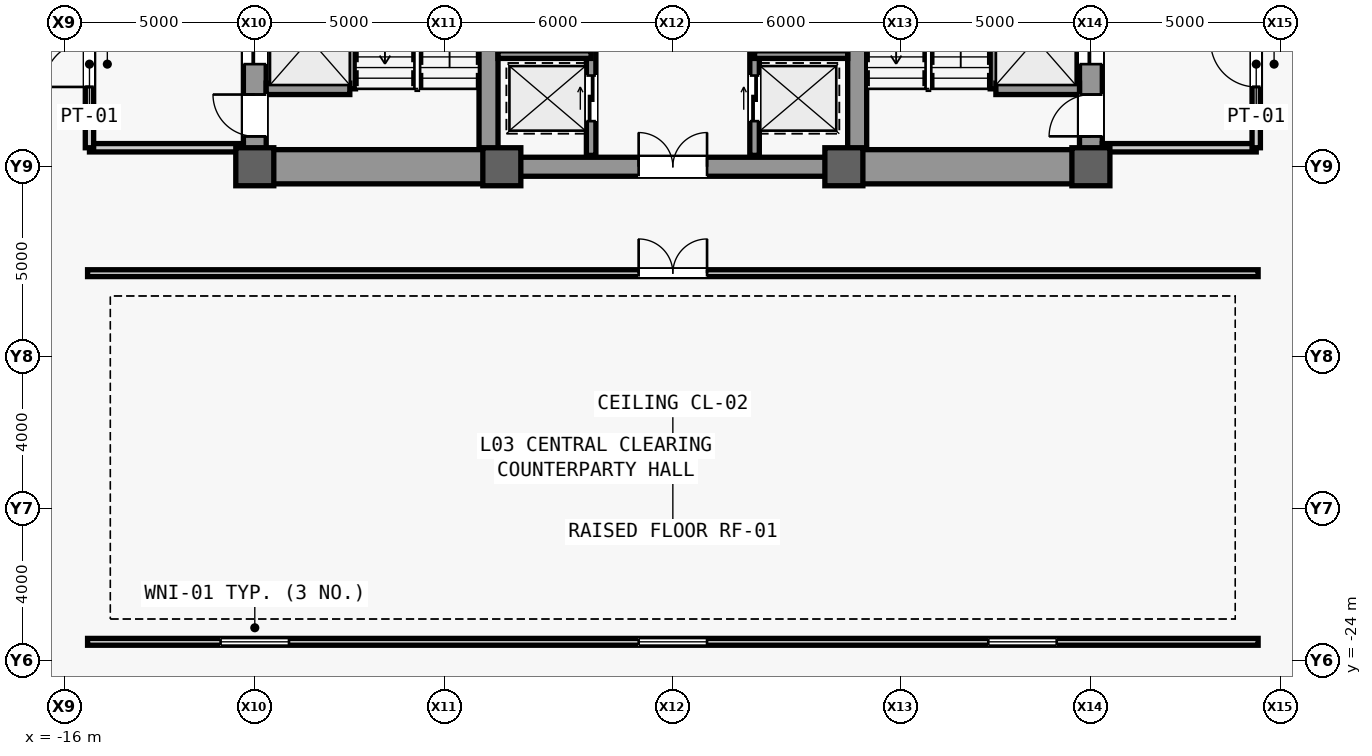
"""IFC4 building model, lengths in metres.
Left out: names, types, materials, properties, quantities, classifications, styles, units other than length and angle.
Written with IfcOpenShell. Run it as: python <this file> out.ifc"""

import sys

from ifc_helpers import new_model, si_unit, direction, frame, frame_2d, origin, origin_2d, place, context, subcontext, project, spatial, rectangle, extrude, source, transform, mapped, element, fill, save


model = new_model("IFC4")
c1 = context("Model", 3, precision=1e-05, world=origin(), true_north=direction((0.0, 1.0)))
c2 = subcontext(c1, "Body", "Model", "MODEL_VIEW")
j1 = project(units=[si_unit("LENGTHUNIT", "METRE"), si_unit("PLANEANGLEUNIT", "RADIAN")], contexts=[c1])
p1 = place(None, origin())
s1 = spatial("IfcSite", under=j1, at=p1, CompositionType="ELEMENT")
p2 = place(p1, origin())
s2 = spatial("IfcBuilding", under=s1, at=p2, CompositionType="ELEMENT")
p3 = place(p2, frame((0.0, 0.0, 17.4)))
s3 = spatial("IfcBuildingStorey", under=s2, at=p3, CompositionType="ELEMENT", Elevation=17.4)
m1 = source(origin(), c2, "Body", "SweptSolid", [
    extrude(rectangle(XDim=22.0, YDim=0.6, at=frame_2d((11.0, 0.0))), origin(), (0.0, 0.0, 1.0), 4.48),
])
p4 = place(p3, frame((-11.0, -11.0, 0.0), z_axis=(0.0, 0.0, 1.0), x_axis=(0.0, 1.0, 0.0)))
e1 = element("IfcWall", 1, at=p4, inside=s3, PredefinedType="SHEAR", context=c2, shape_type="MappedRepresentation", body=[
    mapped(m1, transform((0.0, 0.0, 0.0), scale=1.0)),
])
m2 = source(origin(), c2, "Body", "SweptSolid", [
    extrude(rectangle(XDim=1.1, YDim=2.2, at=frame_2d((0.55, 1.1))), frame((0.0, 0.31, 0.0), z_axis=(0.0, -1.0, 0.0), x_axis=(1.0, 0.0, 0.0)), (0.0, 0.0, 1.0), 0.62),
])
p5 = place(p4, frame((0.8, 0.0, 0.0)))
e2 = element("IfcOpeningElement", 2, at=p5, cuts=e1, PredefinedType="OPENING", context=c2, shape_type="MappedRepresentation", body=[
    mapped(m2, transform((0.0, 0.0, 0.0), scale=1.0)),
])
p6 = place(p4, frame((12.5, 0.0, 0.0)))
e3 = element("IfcOpeningElement", 3, at=p6, cuts=e1, PredefinedType="OPENING", context=c2, shape_type="MappedRepresentation", body=[
    mapped(m2, transform((0.0, 0.0, 0.0), scale=1.0)),
])
m3 = source(origin(), c2, "Body", "SweptSolid", [
    extrude(rectangle(XDim=0.9, YDim=2.15, at=frame_2d((0.45, 1.075))), frame((0.0, 0.31, 0.0), z_axis=(0.0, -1.0, 0.0), x_axis=(1.0, 0.0, 0.0)), (0.0, 0.0, 1.0), 0.62),
])
p7 = place(p4, frame((6.2, 0.0, 0.0)))
e4 = element("IfcOpeningElement", 4, at=p7, cuts=e1, PredefinedType="OPENING", context=c2, shape_type="MappedRepresentation", body=[
    mapped(m3, transform((0.0, 0.0, 0.0), scale=1.0)),
])
p8 = place(p4, frame((8.05, 0.0, 0.0)))
e5 = element("IfcOpeningElement", 5, at=p8, cuts=e1, PredefinedType="OPENING", context=c2, shape_type="MappedRepresentation", body=[
    mapped(m3, transform((0.0, 0.0, 0.0), scale=1.0)),
])
m4 = source(origin(), c2, "Body", "SweptSolid", [
    extrude(rectangle(XDim=1.3, YDim=2.3, at=frame_2d((0.65, 1.15))), frame((0.0, 0.31, 0.0), z_axis=(0.0, -1.0, 0.0), x_axis=(1.0, 0.0, 0.0)), (0.0, 0.0, 1.0), 0.62),
])
p9 = place(p4, frame((2.7, 0.0, 0.0)))
e6 = element("IfcOpeningElement", 6, at=p9, cuts=e1, PredefinedType="OPENING", context=c2, shape_type="MappedRepresentation", body=[
    mapped(m4, transform((0.0, 0.0, 0.0), scale=1.0)),
])
p10 = place(p3, frame((11.0, -11.0, 0.0), z_axis=(0.0, 0.0, 1.0), x_axis=(0.0, 1.0, 0.0)))
e7 = element("IfcWall", 7, at=p10, inside=s3, PredefinedType="SHEAR", context=c2, shape_type="MappedRepresentation", body=[
    mapped(m1, transform((0.0, 0.0, 0.0), scale=1.0)),
])
p11 = place(p10, frame((0.8, 0.0, 0.0)))
e8 = element("IfcOpeningElement", 8, at=p11, cuts=e7, PredefinedType="OPENING", context=c2, shape_type="MappedRepresentation", body=[
    mapped(m2, transform((0.0, 0.0, 0.0), scale=1.0)),
])
p12 = place(p10, frame((6.85, 0.0, 0.0)))
e9 = element("IfcOpeningElement", 9, at=p12, cuts=e7, PredefinedType="OPENING", context=c2, shape_type="MappedRepresentation", body=[
    mapped(m3, transform((0.0, 0.0, 0.0), scale=1.0)),
])
p13 = place(p10, frame((2.7, 0.0, 0.0)))
e10 = element("IfcOpeningElement", 10, at=p13, cuts=e7, PredefinedType="OPENING", context=c2, shape_type="MappedRepresentation", body=[
    mapped(m4, transform((0.0, 0.0, 0.0), scale=1.0)),
])
p14 = place(p10, frame((13.35, 0.0, 0.0)))
e11 = element("IfcOpeningElement", 11, at=p14, cuts=e7, PredefinedType="OPENING", context=c2, shape_type="MappedRepresentation", body=[
    mapped(m4, transform((0.0, 0.0, 0.0), scale=1.0)),
])
m5 = source(origin(), c2, "Body", "SweptSolid", [
    extrude(rectangle(XDim=21.4, YDim=0.5, at=frame_2d((10.7, 0.0))), origin(), (0.0, 0.0, 1.0), 4.48),
])
for number, where, z_axis, x_axis in (
    (12, (-4.85, -10.7, 0.0), (0.0, 0.0, 1.0), (0.0, 1.0, 0.0)),
    (13, (4.85, -10.7, 0.0), (0.0, 0.0, 1.0), (0.0, 1.0, 0.0)),
):
    element("IfcWall", number, at=place(p3, frame(where, z_axis=z_axis, x_axis=x_axis)), inside=s3, PredefinedType="SHEAR", context=c2, shape_type="MappedRepresentation", body=[
        mapped(m5, transform((0.0, 0.0, 0.0), scale=1.0)),
    ])
m6 = source(origin(), c2, "Body", "SweptSolid", [
    extrude(rectangle(XDim=5.85, YDim=0.9, at=frame_2d((2.925, 0.0))), origin(), (0.0, 0.0, 1.0), 4.48),
])
for number, where, z_axis, x_axis in (
    (14, (-10.7, -11.0, 0.0), (0.0, 0.0, 1.0), (1.0, 0.0, 0.0)),
    (15, (4.85, -11.0, 0.0), (0.0, 0.0, 1.0), (1.0, 0.0, 0.0)),
):
    element("IfcWall", number, at=place(p3, frame(where, z_axis=z_axis, x_axis=x_axis)), inside=s3, PredefinedType="SHEAR", context=c2, shape_type="MappedRepresentation", body=[
        mapped(m6, transform((0.0, 0.0, 0.0), scale=1.0)),
    ])
m7 = source(origin(), c2, "Body", "SweptSolid", [
    extrude(rectangle(XDim=9.2, YDim=0.5, at=frame_2d((4.6, 0.0))), origin(), (0.0, 0.0, 1.0), 4.48),
])
p15 = place(p3, frame((-4.6, -11.0, 0.0), z_axis=(0.0, 0.0, 1.0), x_axis=(1.0, 0.0, 0.0)))
e16 = element("IfcWall", 16, at=p15, inside=s3, PredefinedType="SHEAR", context=c2, shape_type="MappedRepresentation", body=[
    mapped(m7, transform((0.0, 0.0, 0.0), scale=1.0)),
])
m8 = source(origin(), c2, "Body", "SweptSolid", [
    extrude(rectangle(XDim=1.8, YDim=2.25, at=frame_2d((0.9, 1.125))), frame((0.0, 0.26, 0.0), z_axis=(0.0, -1.0, 0.0), x_axis=(1.0, 0.0, 0.0)), (0.0, 0.0, 1.0), 0.52),
])
p16 = place(p15, frame((3.7, 0.0, 0.0)))
e17 = element("IfcOpeningElement", 17, at=p16, cuts=e16, PredefinedType="OPENING", context=c2, shape_type="MappedRepresentation", body=[
    mapped(m8, transform((0.0, 0.0, 0.0), scale=1.0)),
])
m9 = source(origin(), c2, "Body", "SweptSolid", [
    extrude(rectangle(XDim=1.0, YDim=1.0, at=origin_2d()), origin(), (0.0, 0.0, 1.0), 4.8),
])
for number, where, z_axis, x_axis in (
    (18, (-11.0, -11.0, 0.0), (0.0, 0.0, 1.0), (1.0, 0.0, 0.0)),
    (19, (-4.5, -11.0, 0.0), (0.0, 0.0, 1.0), (1.0, 0.0, 0.0)),
    (20, (4.5, -11.0, 0.0), (0.0, 0.0, 1.0), (1.0, 0.0, 0.0)),
    (21, (11.0, -11.0, 0.0), (0.0, 0.0, 1.0), (1.0, 0.0, 0.0)),
):
    element("IfcColumn", number, at=place(p3, frame(where, z_axis=z_axis, x_axis=x_axis)), inside=s3, PredefinedType="COLUMN", context=c2, shape_type="MappedRepresentation", body=[
        mapped(m9, transform((0.0, 0.0, 0.0), scale=1.0)),
    ])
m10 = source(origin(), c2, "Body", "SweptSolid", [
    extrude(rectangle(XDim=7.8, YDim=0.3, at=frame_2d((3.9, 0.0))), origin(), (0.0, 0.0, 1.0), 4.48),
])
p17 = place(p3, frame((-8.5, -8.95, 0.0), z_axis=(0.0, 0.0, 1.0), x_axis=(0.0, 1.0, 0.0)))
e22 = element("IfcWall", 22, at=p17, inside=s3, PredefinedType="SHEAR", context=c2, shape_type="MappedRepresentation", body=[
    mapped(m10, transform((0.0, 0.0, 0.0), scale=1.0)),
])
m11 = source(origin(), c2, "Body", "SweptSolid", [
    extrude(rectangle(XDim=2.2, YDim=0.3, at=frame_2d((1.1, 0.0))), origin(), (0.0, 0.0, 1.0), 4.48),
])
p18 = place(p3, frame((-10.7, -8.95, 0.0), z_axis=(0.0, 0.0, 1.0), x_axis=(1.0, 0.0, 0.0)))
e23 = element("IfcWall", 23, at=p18, inside=s3, PredefinedType="SHEAR", context=c2, shape_type="MappedRepresentation", body=[
    mapped(m11, transform((0.0, 0.0, 0.0), scale=1.0)),
])
p19 = place(p3, frame((8.5, -8.95, 0.0), z_axis=(0.0, 0.0, 1.0), x_axis=(0.0, 1.0, 0.0)))
e24 = element("IfcWall", 24, at=p19, inside=s3, PredefinedType="SHEAR", context=c2, shape_type="MappedRepresentation", body=[
    mapped(m10, transform((0.0, 0.0, 0.0), scale=1.0)),
])
p20 = place(p3, frame((8.5, -8.95, 0.0), z_axis=(0.0, 0.0, 1.0), x_axis=(1.0, 0.0, 0.0)))
e25 = element("IfcWall", 25, at=p20, inside=s3, PredefinedType="SHEAR", context=c2, shape_type="MappedRepresentation", body=[
    mapped(m11, transform((0.0, 0.0, 0.0), scale=1.0)),
])
m12 = source(origin(), c2, "Body", "SweptSolid", [
    extrude(rectangle(XDim=4.05, YDim=0.22, at=frame_2d((2.025, 0.0))), origin(), (0.0, 0.0, 1.0), 4.48),
])
p21 = place(p3, frame((-15.35, -10.5, 0.0), z_axis=(0.0, 0.0, 1.0), x_axis=(1.0, 0.0, 0.0)))
e26 = element("IfcWall", 26, at=p21, inside=s3, PredefinedType="PARTITIONING", context=c2, shape_type="MappedRepresentation", body=[
    mapped(m12, transform((0.0, 0.0, 0.0), scale=1.0)),
])
m13 = source(origin(), c2, "Body", "SweptSolid", [
    extrude(rectangle(XDim=4.4, YDim=0.22, at=frame_2d((2.2, 0.0))), origin(), (0.0, 0.0, 1.0), 4.48),
])
p22 = place(p3, frame((-15.35, -10.5, 0.0), z_axis=(0.0, 0.0, 1.0), x_axis=(0.0, 1.0, 0.0)))
e27 = element("IfcWall", 27, at=p22, inside=s3, PredefinedType="PARTITIONING", context=c2, shape_type="MappedRepresentation", body=[
    mapped(m13, transform((0.0, 0.0, 0.0), scale=1.0)),
])
m14 = source(origin(), c2, "Body", "SweptSolid", [
    extrude(rectangle(XDim=1.2, YDim=2.2, at=frame_2d((0.6, 1.1))), frame((0.0, 0.12, 0.0), z_axis=(0.0, -1.0, 0.0), x_axis=(1.0, 0.0, 0.0)), (0.0, 0.0, 1.0), 0.24),
])
p23 = place(p22, frame((1.6, 0.0, 0.0)))
e28 = element("IfcOpeningElement", 28, at=p23, cuts=e27, PredefinedType="OPENING", context=c2, shape_type="MappedRepresentation", body=[
    mapped(m14, transform((0.0, 0.0, 0.0), scale=1.0)),
])
p24 = place(p3, frame((11.3, -10.5, 0.0), z_axis=(0.0, 0.0, 1.0), x_axis=(1.0, 0.0, 0.0)))
e29 = element("IfcWall", 29, at=p24, inside=s3, PredefinedType="PARTITIONING", context=c2, shape_type="MappedRepresentation", body=[
    mapped(m12, transform((0.0, 0.0, 0.0), scale=1.0)),
])
p25 = place(p3, frame((15.35, -10.5, 0.0), z_axis=(0.0, 0.0, 1.0), x_axis=(0.0, 1.0, 0.0)))
e30 = element("IfcWall", 30, at=p25, inside=s3, PredefinedType="PARTITIONING", context=c2, shape_type="MappedRepresentation", body=[
    mapped(m13, transform((0.0, 0.0, 0.0), scale=1.0)),
])
p26 = place(p25, frame((1.6, 0.0, 0.0)))
e31 = element("IfcOpeningElement", 31, at=p26, cuts=e30, PredefinedType="OPENING", context=c2, shape_type="MappedRepresentation", body=[
    mapped(m14, transform((0.0, 0.0, 0.0), scale=1.0)),
])
m15 = source(origin(), c2, "Body", "SweptSolid", [
    extrude(rectangle(XDim=5.4, YDim=0.25, at=frame_2d((2.7, 0.0))), origin(), (0.0, 0.0, 1.0), 4.48),
])
p27 = place(p3, frame((-2.15, -10.7, 0.0), z_axis=(0.0, 0.0, 1.0), x_axis=(0.0, 1.0, 0.0)))
e32 = element("IfcWall", 32, at=p27, inside=s3, PredefinedType="SHEAR", context=c2, shape_type="MappedRepresentation", body=[
    mapped(m15, transform((0.0, 0.0, 0.0), scale=1.0)),
])
m16 = source(origin(), c2, "Body", "SweptSolid", [
    extrude(rectangle(XDim=1.2, YDim=2.3, at=frame_2d((0.6, 1.15))), frame((0.0, 0.135, 0.0), z_axis=(0.0, -1.0, 0.0), x_axis=(1.0, 0.0, 0.0)), (0.0, 0.0, 1.0), 0.27),
])
p28 = place(p27, frame((0.9, 0.0, 0.0)))
e33 = element("IfcOpeningElement", 33, at=p28, cuts=e32, PredefinedType="OPENING", context=c2, shape_type="MappedRepresentation", body=[
    mapped(m16, transform((0.0, 0.0, 0.0), scale=1.0)),
])
p29 = place(p27, frame((3.2, 0.0, 0.0)))
e34 = element("IfcOpeningElement", 34, at=p29, cuts=e32, PredefinedType="OPENING", context=c2, shape_type="MappedRepresentation", body=[
    mapped(m16, transform((0.0, 0.0, 0.0), scale=1.0)),
])
p30 = place(p3, frame((2.15, -10.7, 0.0), z_axis=(0.0, 0.0, 1.0), x_axis=(0.0, 1.0, 0.0)))
e35 = element("IfcWall", 35, at=p30, inside=s3, PredefinedType="SHEAR", context=c2, shape_type="MappedRepresentation", body=[
    mapped(m15, transform((0.0, 0.0, 0.0), scale=1.0)),
])
p31 = place(p30, frame((0.9, 0.0, 0.0)))
e36 = element("IfcOpeningElement", 36, at=p31, cuts=e35, PredefinedType="OPENING", context=c2, shape_type="MappedRepresentation", body=[
    mapped(m16, transform((0.0, 0.0, 0.0), scale=1.0)),
])
p32 = place(p30, frame((3.2, 0.0, 0.0)))
e37 = element("IfcOpeningElement", 37, at=p32, cuts=e35, PredefinedType="OPENING", context=c2, shape_type="MappedRepresentation", body=[
    mapped(m16, transform((0.0, 0.0, 0.0), scale=1.0)),
])
m17 = source(origin(), c2, "Body", "SweptSolid", [
    extrude(rectangle(XDim=2.45, YDim=0.2, at=frame_2d((1.225, 0.0))), origin(), (0.0, 0.0, 1.0), 4.48),
])
for number, where, z_axis, x_axis in (
    (38, (-4.6, -8.05, 0.0), (0.0, 0.0, 1.0), (1.0, 0.0, 0.0)),
    (39, (2.15, -8.05, 0.0), (0.0, 0.0, 1.0), (1.0, 0.0, 0.0)),
):
    element("IfcWall", number, at=place(p3, frame(where, z_axis=z_axis, x_axis=x_axis)), inside=s3, PredefinedType="SHEAR", context=c2, shape_type="MappedRepresentation", body=[
        mapped(m17, transform((0.0, 0.0, 0.0), scale=1.0)),
    ])
m18 = source(origin(), c2, "Body", "SweptSolid", [
    extrude(rectangle(XDim=30.8, YDim=0.18, at=frame_2d((15.4, 0.0))), origin(), (0.0, 0.0, 1.0), 4.48),
])
p33 = place(p3, frame((-15.4, -13.8, 0.0), z_axis=(0.0, 0.0, 1.0), x_axis=(1.0, 0.0, 0.0)))
e40 = element("IfcWall", 40, at=p33, inside=s3, PredefinedType="PARTITIONING", context=c2, shape_type="MappedRepresentation", body=[
    mapped(m18, transform((0.0, 0.0, 0.0), scale=1.0)),
])
m19 = source(origin(), c2, "Body", "SweptSolid", [
    extrude(rectangle(XDim=1.8, YDim=2.25, at=frame_2d((0.9, 1.125))), frame((0.0, 0.1, 0.0), z_axis=(0.0, -1.0, 0.0), x_axis=(1.0, 0.0, 0.0)), (0.0, 0.0, 1.0), 0.2),
])
p34 = place(p33, frame((14.5, 0.0, 0.0)))
e41 = element("IfcOpeningElement", 41, at=p34, cuts=e40, PredefinedType="OPENING", context=c2, shape_type="MappedRepresentation", body=[
    mapped(m19, transform((0.0, 0.0, 0.0), scale=1.0)),
])
p35 = place(p3, frame((-15.4, -23.5, 0.0), z_axis=(0.0, 0.0, 1.0), x_axis=(1.0, 0.0, 0.0)))
e42 = element("IfcWall", 42, at=p35, inside=s3, PredefinedType="PARTITIONING", context=c2, shape_type="MappedRepresentation", body=[
    mapped(m18, transform((0.0, 0.0, 0.0), scale=1.0)),
])
m20 = source(origin(), c2, "Body", "SweptSolid", [
    extrude(rectangle(XDim=1.8, YDim=1.4, at=frame_2d((0.9, 0.7))), frame((0.0, 0.1, 0.0), z_axis=(0.0, -1.0, 0.0), x_axis=(1.0, 0.0, 0.0)), (0.0, 0.0, 1.0), 0.2),
])
p36 = place(p35, frame((3.5, 0.0, 0.9)))
e43 = element("IfcOpeningElement", 43, at=p36, cuts=e42, PredefinedType="OPENING", context=c2, shape_type="MappedRepresentation", body=[
    mapped(m20, transform((0.0, 0.0, 0.0), scale=1.0)),
])
p37 = place(p35, frame((14.5, 0.0, 0.9)))
e44 = element("IfcOpeningElement", 44, at=p37, cuts=e42, PredefinedType="OPENING", context=c2, shape_type="MappedRepresentation", body=[
    mapped(m20, transform((0.0, 0.0, 0.0), scale=1.0)),
])
p38 = place(p35, frame((23.7, 0.0, 0.9)))
e45 = element("IfcOpeningElement", 45, at=p38, cuts=e42, PredefinedType="OPENING", context=c2, shape_type="MappedRepresentation", body=[
    mapped(m20, transform((0.0, 0.0, 0.0), scale=1.0)),
])
m21 = source(origin(), c2, "Body", "SweptSolid", [
    extrude(rectangle(XDim=1.1, YDim=2.2, at=frame_2d((0.55, 1.1))), frame((0.0, 0.025, 0.0), z_axis=(0.0, -1.0, 0.0), x_axis=(1.0, 0.0, 0.0)), (0.0, 0.0, 1.0), 0.05),
])
p39 = place(p5, origin())
e46 = element("IfcDoor", 46, at=p39, inside=s3, OperationType="SINGLE_SWING_RIGHT", PredefinedType="DOOR", context=c2, shape_type="MappedRepresentation", body=[
    mapped(m21, transform((0.0, 0.0, 0.0), scale=1.0)),
])
fill(e2, e46)
p40 = place(p11, origin())
e47 = element("IfcDoor", 47, at=p40, inside=s3, OperationType="SINGLE_SWING_LEFT", PredefinedType="DOOR", context=c2, shape_type="MappedRepresentation", body=[
    mapped(m21, transform((0.0, 0.0, 0.0), scale=1.0)),
])
fill(e8, e47)
m22 = source(origin(), c2, "Body", "SweptSolid", [
    extrude(rectangle(XDim=1.2, YDim=2.2, at=frame_2d((0.6, 1.1))), frame((0.0, 0.025, 0.0), z_axis=(0.0, -1.0, 0.0), x_axis=(1.0, 0.0, 0.0)), (0.0, 0.0, 1.0), 0.05),
])
p41 = place(p23, origin())
e48 = element("IfcDoor", 48, at=p41, inside=s3, OperationType="SINGLE_SWING_LEFT", PredefinedType="DOOR", context=c2, shape_type="MappedRepresentation", body=[
    mapped(m22, transform((0.0, 0.0, 0.0), scale=1.0)),
])
fill(e28, e48)
p42 = place(p26, origin())
e49 = element("IfcDoor", 49, at=p42, inside=s3, OperationType="SINGLE_SWING_RIGHT", PredefinedType="DOOR", context=c2, shape_type="MappedRepresentation", body=[
    mapped(m22, transform((0.0, 0.0, 0.0), scale=1.0)),
])
fill(e31, e49)
m23 = source(origin(), c2, "Body", "SweptSolid", [
    extrude(rectangle(XDim=1.8, YDim=2.25, at=frame_2d((0.9, 1.125))), frame((0.0, 0.025, 0.0), z_axis=(0.0, -1.0, 0.0), x_axis=(1.0, 0.0, 0.0)), (0.0, 0.0, 1.0), 0.05),
])
p43 = place(p16, origin())
e50 = element("IfcDoor", 50, at=p43, inside=s3, OperationType="SINGLE_SWING_LEFT", PredefinedType="DOOR", context=c2, shape_type="MappedRepresentation", body=[
    mapped(m23, transform((0.0, 0.0, 0.0), scale=1.0)),
])
fill(e17, e50)
p44 = place(p34, origin())
e51 = element("IfcDoor", 51, at=p44, inside=s3, OperationType="SINGLE_SWING_LEFT", PredefinedType="DOOR", context=c2, shape_type="MappedRepresentation", body=[
    mapped(m23, transform((0.0, 0.0, 0.0), scale=1.0)),
])
fill(e41, e51)
m24 = source(origin(), c2, "Body", "SweptSolid", [
    extrude(rectangle(XDim=1.8, YDim=1.4, at=frame_2d((0.9, 0.7))), frame((0.0, 0.03, 0.0), z_axis=(0.0, -1.0, 0.0), x_axis=(1.0, 0.0, 0.0)), (0.0, 0.0, 1.0), 0.06),
])
p45 = place(p36, origin())
e52 = element("IfcWindow", 52, at=p45, inside=s3, PartitioningType="SINGLE_PANEL", PredefinedType="WINDOW", context=c2, shape_type="MappedRepresentation", body=[
    mapped(m24, transform((0.0, 0.0, 0.0), scale=1.0)),
])
fill(e43, e52)
p46 = place(p37, origin())
e53 = element("IfcWindow", 53, at=p46, inside=s3, PartitioningType="SINGLE_PANEL", PredefinedType="WINDOW", context=c2, shape_type="MappedRepresentation", body=[
    mapped(m24, transform((0.0, 0.0, 0.0), scale=1.0)),
])
fill(e44, e53)
p47 = place(p38, origin())
e54 = element("IfcWindow", 54, at=p47, inside=s3, PartitioningType="SINGLE_PANEL", PredefinedType="WINDOW", context=c2, shape_type="MappedRepresentation", body=[
    mapped(m24, transform((0.0, 0.0, 0.0), scale=1.0)),
])
fill(e45, e54)
m25 = source(origin(), c2, "Body", "SweptSolid", [
    extrude(rectangle(XDim=1.2, YDim=2.3, at=frame_2d((0.6, 1.15))), frame((0.0, 0.025, 0.0), z_axis=(0.0, -1.0, 0.0), x_axis=(1.0, 0.0, 0.0)), (0.0, 0.0, 1.0), 0.05),
])
p48 = place(p28, origin())
e55 = element("IfcDoor", 55, at=p48, inside=s3, OperationType="SLIDING_TO_LEFT", PredefinedType="DOOR", context=c2, shape_type="MappedRepresentation", body=[
    mapped(m25, transform((0.0, 0.0, 0.0), scale=1.0)),
])
fill(e33, e55)
p49 = place(p31, origin())
e56 = element("IfcDoor", 56, at=p49, inside=s3, OperationType="SLIDING_TO_LEFT", PredefinedType="DOOR", context=c2, shape_type="MappedRepresentation", body=[
    mapped(m25, transform((0.0, 0.0, 0.0), scale=1.0)),
])
fill(e36, e56)
m26 = source(origin(), c2, "Body", "SweptSolid", [
    extrude(rectangle(XDim=1.3, YDim=2.3, at=frame_2d((0.65, 1.15))), frame((0.0, 0.025, 0.0), z_axis=(0.0, -1.0, 0.0), x_axis=(1.0, 0.0, 0.0)), (0.0, 0.0, 1.0), 0.05),
])
p50 = place(p9, origin())
e57 = element("IfcDoor", 57, at=p50, inside=s3, OperationType="SLIDING_TO_LEFT", PredefinedType="DOOR", context=c2, shape_type="MappedRepresentation", body=[
    mapped(m26, transform((0.0, 0.0, 0.0), scale=1.0)),
])
fill(e6, e57)
p51 = place(p13, origin())
e58 = element("IfcDoor", 58, at=p51, inside=s3, OperationType="SLIDING_TO_LEFT", PredefinedType="DOOR", context=c2, shape_type="MappedRepresentation", body=[
    mapped(m26, transform((0.0, 0.0, 0.0), scale=1.0)),
])
fill(e10, e58)
save(model, sys.argv[1])
